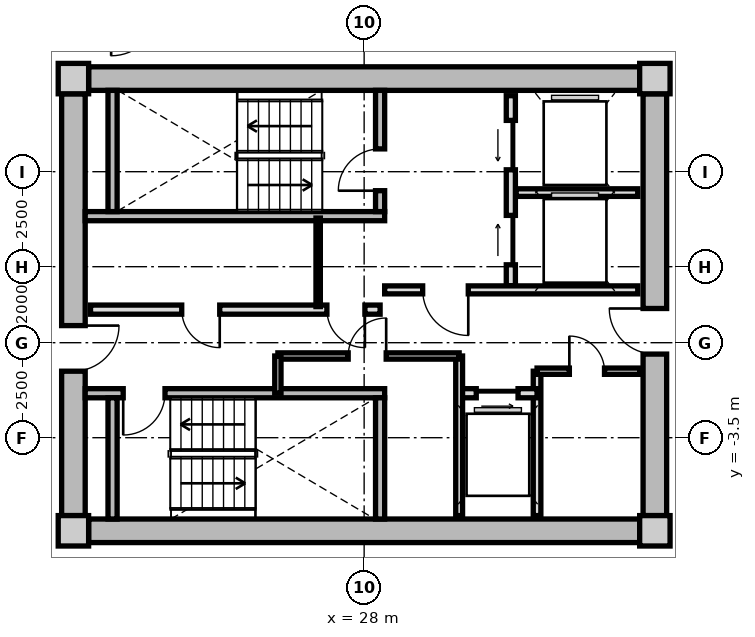
"""IFC4 building model, lengths in metres.
Left out: names, types, materials, properties, quantities, classifications, styles, units other than length and angle.
Written with IfcOpenShell. Run it as: python <this file> out.ifc"""

import sys

from ifc_helpers import new_model, si_unit, direction, frame, frame_2d, origin, origin_2d, place, context, subcontext, project, spatial, rectangle, extrude, source, transform, mapped, element, fill, save


model = new_model("IFC4")
c1 = context("Model", 3, precision=1e-05, world=origin(), true_north=direction((0.0, 1.0)))
c2 = subcontext(c1, "Body", "Model", "MODEL_VIEW")
j1 = project(units=[si_unit("LENGTHUNIT", "METRE"), si_unit("PLANEANGLEUNIT", "RADIAN")], contexts=[c1])
p1 = place(None, origin())
s1 = spatial("IfcSite", under=j1, at=p1, CompositionType="ELEMENT")
p2 = place(p1, origin())
s2 = spatial("IfcBuilding", under=s1, at=p2, CompositionType="ELEMENT")
p3 = place(p2, frame((0.0, 0.0, 173.95)))
s3 = spatial("IfcBuildingStorey", under=s2, at=p3, CompositionType="ELEMENT", Elevation=173.95)
m1 = source(origin(), c2, "Body", "SweptSolid", [
    extrude(rectangle(XDim=0.8, YDim=0.8, at=origin_2d()), origin(), (0.0, 0.0, 1.0), 3.05),
])
for number, where, z_axis, x_axis in (
    (1, (20.35, -5.95, 0.0), (0.0, 0.0, 1.0), (1.0, 0.0, 0.0)),
    (2, (35.65, -5.95, 0.0), (0.0, 0.0, 1.0), (1.0, 0.0, 0.0)),
    (3, (35.65, 5.95, 0.0), (0.0, 0.0, 1.0), (1.0, 0.0, 0.0)),
    (4, (20.35, 5.95, 0.0), (0.0, 0.0, 1.0), (1.0, 0.0, 0.0)),
):
    element("IfcColumn", number, at=place(p3, frame(where, z_axis=z_axis, x_axis=x_axis)), inside=s3, PredefinedType="COLUMN", context=c2, shape_type="MappedRepresentation", body=[
        mapped(m1, transform((0.0, 0.0, 0.0), x_axis=(1.0, 0.0, 0.0), y_axis=(0.0, 1.0, 0.0), z_axis=(0.0, 0.0, 1.0), scale=1.0)),
    ])
m2 = source(origin(), c2, "Body", "SweptSolid", [
    extrude(rectangle(XDim=14.5, YDim=0.62, at=frame_2d((7.25, 0.0))), origin(), (0.0, 0.0, 1.0), 2.81),
])
for number, where, z_axis, x_axis in (
    (5, (20.75, 5.95, 0.0), (0.0, 0.0, 1.0), (1.0, 0.0, 0.0)),
    (6, (35.25, -5.95, 0.0), (0.0, 0.0, 1.0), (-1.0, 0.0, 0.0)),
):
    element("IfcWall", number, at=place(p3, frame(where, z_axis=z_axis, x_axis=x_axis)), inside=s3, PredefinedType="SHEAR", context=c2, shape_type="MappedRepresentation", body=[
        mapped(m2, transform((0.0, 0.0, 0.0), x_axis=(1.0, 0.0, 0.0), y_axis=(0.0, 1.0, 0.0), z_axis=(0.0, 0.0, 1.0), scale=1.0)),
    ])
m3 = source(origin(), c2, "Body", "SweptSolid", [
    extrude(rectangle(XDim=11.1, YDim=0.62, at=frame_2d((5.55, 0.0))), origin(), (0.0, 0.0, 1.0), 2.81),
])
p4 = place(p3, frame((20.35, -5.55, 0.0), z_axis=(0.0, 0.0, 1.0), x_axis=(0.0, 1.0, 0.0)))
e7 = element("IfcWall", 7, at=p4, inside=s3, PredefinedType="SHEAR", context=c2, shape_type="MappedRepresentation", body=[
    mapped(m3, transform((0.0, 0.0, 0.0), x_axis=(1.0, 0.0, 0.0), y_axis=(0.0, 1.0, 0.0), z_axis=(0.0, 0.0, 1.0), scale=1.0)),
])
p5 = place(p4, frame((3.8, 0.0, 0.0)))
e8 = element("IfcOpeningElement", 8, at=p5, cuts=e7, PredefinedType="OPENING", context=c2, shape_type="SweptSolid", body=[
    extrude(rectangle(XDim=1.2, YDim=2.15, at=frame_2d((0.6, 1.075))), frame((0.0, 0.32, 0.0), z_axis=(0.0, -1.0, 0.0), x_axis=(1.0, 0.0, 0.0)), (0.0, 0.0, 1.0), 0.64),
])
p6 = place(p3, frame((35.65, 5.55, 0.0), z_axis=(0.0, 0.0, 1.0), x_axis=(0.0, -1.0, 0.0)))
e9 = element("IfcWall", 9, at=p6, inside=s3, PredefinedType="SHEAR", context=c2, shape_type="MappedRepresentation", body=[
    mapped(m3, transform((0.0, 0.0, 0.0), x_axis=(1.0, 0.0, 0.0), y_axis=(0.0, 1.0, 0.0), z_axis=(0.0, 0.0, 1.0), scale=1.0)),
])
p7 = place(p6, frame((5.65, 0.0, 0.0)))
e10 = element("IfcOpeningElement", 10, at=p7, cuts=e9, PredefinedType="OPENING", context=c2, shape_type="SweptSolid", body=[
    extrude(rectangle(XDim=1.2, YDim=2.15, at=frame_2d((0.6, 1.075))), frame((0.0, 0.32, 0.0), z_axis=(0.0, -1.0, 0.0), x_axis=(1.0, 0.0, 0.0)), (0.0, 0.0, 1.0), 0.64),
])
m4 = source(origin(), c2, "Body", "SweptSolid", [
    extrude(rectangle(XDim=7.88, YDim=0.24, at=frame_2d((3.94, 0.0))), origin(), (0.0, 0.0, 1.0), 2.81),
])
p8 = place(p3, frame((20.66, 2.33, 0.0), z_axis=(0.0, 0.0, 1.0), x_axis=(1.0, 0.0, 0.0)))
e11 = element("IfcWall", 11, at=p8, inside=s3, PredefinedType="PARTITIONING", context=c2, shape_type="MappedRepresentation", body=[
    mapped(m4, transform((0.0, 0.0, 0.0), x_axis=(1.0, 0.0, 0.0), y_axis=(0.0, 1.0, 0.0), z_axis=(0.0, 0.0, 1.0), scale=1.0)),
])
m5 = source(origin(), c2, "Body", "SweptSolid", [
    extrude(rectangle(XDim=3.19, YDim=0.24, at=frame_2d((1.595, 0.0))), origin(), (0.0, 0.0, 1.0), 2.81),
])
p9 = place(p3, frame((21.38, 2.45, 0.0), z_axis=(0.0, 0.0, 1.0), x_axis=(0.0, 1.0, 0.0)))
e12 = element("IfcWall", 12, at=p9, inside=s3, PredefinedType="PARTITIONING", context=c2, shape_type="MappedRepresentation", body=[
    mapped(m5, transform((0.0, 0.0, 0.0), x_axis=(1.0, 0.0, 0.0), y_axis=(0.0, 1.0, 0.0), z_axis=(0.0, 0.0, 1.0), scale=1.0)),
])
p10 = place(p3, frame((28.42, 2.45, 0.0), z_axis=(0.0, 0.0, 1.0), x_axis=(0.0, 1.0, 0.0)))
e13 = element("IfcWall", 13, at=p10, inside=s3, PredefinedType="PARTITIONING", context=c2, shape_type="MappedRepresentation", body=[
    mapped(m5, transform((0.0, 0.0, 0.0), x_axis=(1.0, 0.0, 0.0), y_axis=(0.0, 1.0, 0.0), z_axis=(0.0, 0.0, 1.0), scale=1.0)),
])
p11 = place(p10, frame((0.55, 0.0, 0.0)))
e14 = element("IfcOpeningElement", 14, at=p11, cuts=e13, PredefinedType="OPENING", context=c2, shape_type="SweptSolid", body=[
    extrude(rectangle(XDim=1.1, YDim=2.15, at=frame_2d((0.55, 1.075))), frame((0.0, 0.13, 0.0), z_axis=(0.0, -1.0, 0.0), x_axis=(1.0, 0.0, 0.0)), (0.0, 0.0, 1.0), 0.26),
])
p12 = place(p3, frame((20.66, -2.33, 0.0), z_axis=(0.0, 0.0, 1.0), x_axis=(1.0, 0.0, 0.0)))
e15 = element("IfcWall", 15, at=p12, inside=s3, PredefinedType="PARTITIONING", context=c2, shape_type="MappedRepresentation", body=[
    mapped(m4, transform((0.0, 0.0, 0.0), x_axis=(1.0, 0.0, 0.0), y_axis=(0.0, 1.0, 0.0), z_axis=(0.0, 0.0, 1.0), scale=1.0)),
])
p13 = place(p12, frame((1.0, 0.0, 0.0)))
e16 = element("IfcOpeningElement", 16, at=p13, cuts=e15, PredefinedType="OPENING", context=c2, shape_type="SweptSolid", body=[
    extrude(rectangle(XDim=1.1, YDim=2.15, at=frame_2d((0.55, 1.075))), frame((0.0, 0.13, 0.0), z_axis=(0.0, -1.0, 0.0), x_axis=(1.0, 0.0, 0.0)), (0.0, 0.0, 1.0), 0.26),
])
for number, where, z_axis, x_axis in (
    (17, (21.38, -5.64, 0.0), (0.0, 0.0, 1.0), (0.0, 1.0, 0.0)),
    (18, (28.42, -5.64, 0.0), (0.0, 0.0, 1.0), (0.0, 1.0, 0.0)),
):
    element("IfcWall", number, at=place(p3, frame(where, z_axis=z_axis, x_axis=x_axis)), inside=s3, PredefinedType="PARTITIONING", context=c2, shape_type="MappedRepresentation", body=[
        mapped(m5, transform((0.0, 0.0, 0.0), x_axis=(1.0, 0.0, 0.0), y_axis=(0.0, 1.0, 0.0), z_axis=(0.0, 0.0, 1.0), scale=1.0)),
    ])
m6 = source(origin(), c2, "Body", "SweptSolid", [
    extrude(rectangle(XDim=5.0, YDim=0.24, at=frame_2d((2.5, 0.0))), origin(), (0.0, 0.0, 1.0), 2.795),
])
p14 = place(p3, frame((31.86, 0.5, 0.0), z_axis=(0.0, 0.0, 1.0), x_axis=(0.0, 1.0, 0.0)))
e19 = element("IfcWall", 19, at=p14, inside=s3, PredefinedType="PARTITIONING", context=c2, shape_type="MappedRepresentation", body=[
    mapped(m6, transform((0.0, 0.0, 0.0), x_axis=(1.0, 0.0, 0.0), y_axis=(0.0, 1.0, 0.0), z_axis=(0.0, 0.0, 1.0), scale=1.0)),
])
p15 = place(p14, frame((3.05, 0.0, 0.0)))
e20 = element("IfcOpeningElement", 20, at=p15, cuts=e19, PredefinedType="OPENING", context=c2, shape_type="SweptSolid", body=[
    extrude(rectangle(XDim=1.3, YDim=2.2, at=frame_2d((0.65, 1.1))), frame((0.0, 0.13, 0.0), z_axis=(0.0, -1.0, 0.0), x_axis=(1.0, 0.0, 0.0)), (0.0, 0.0, 1.0), 0.26),
])
p16 = place(p14, frame((0.55, 0.0, 0.0)))
e21 = element("IfcOpeningElement", 21, at=p16, cuts=e19, PredefinedType="OPENING", context=c2, shape_type="SweptSolid", body=[
    extrude(rectangle(XDim=1.3, YDim=2.2, at=frame_2d((0.65, 1.1))), frame((0.0, 0.13, 0.0), z_axis=(0.0, -1.0, 0.0), x_axis=(1.0, 0.0, 0.0)), (0.0, 0.0, 1.0), 0.26),
])
m7 = source(origin(), c2, "Body", "SweptSolid", [
    extrude(rectangle(XDim=3.2, YDim=0.2, at=frame_2d((1.6, 0.0))), origin(), (0.0, 0.0, 1.0), 2.795),
])
p17 = place(p3, frame((32.0, 2.95, 0.0), z_axis=(0.0, 0.0, 1.0), x_axis=(1.0, 0.0, 0.0)))
e22 = element("IfcWall", 22, at=p17, inside=s3, PredefinedType="PARTITIONING", context=c2, shape_type="MappedRepresentation", body=[
    mapped(m7, transform((0.0, 0.0, 0.0), x_axis=(1.0, 0.0, 0.0), y_axis=(0.0, 1.0, 0.0), z_axis=(0.0, 0.0, 1.0), scale=1.0)),
])
m8 = source(origin(), c2, "Body", "SweptSolid", [
    extrude(rectangle(XDim=6.66, YDim=0.21, at=frame_2d((3.33, 0.0))), origin(), (0.0, 0.0, 1.0), 2.795),
])
p18 = place(p3, frame((28.54, 0.39, 0.0), z_axis=(0.0, 0.0, 1.0), x_axis=(1.0, 0.0, 0.0)))
e23 = element("IfcWall", 23, at=p18, inside=s3, PredefinedType="PARTITIONING", context=c2, shape_type="MappedRepresentation", body=[
    mapped(m8, transform((0.0, 0.0, 0.0), x_axis=(1.0, 0.0, 0.0), y_axis=(0.0, 1.0, 0.0), z_axis=(0.0, 0.0, 1.0), scale=1.0)),
])
p19 = place(p18, frame((1.0, 0.0, 0.0)))
e24 = element("IfcOpeningElement", 24, at=p19, cuts=e23, PredefinedType="OPENING", context=c2, shape_type="SweptSolid", body=[
    extrude(rectangle(XDim=1.2, YDim=2.15, at=frame_2d((0.6, 1.075))), frame((0.0, 0.115, 0.0), z_axis=(0.0, -1.0, 0.0), x_axis=(1.0, 0.0, 0.0)), (0.0, 0.0, 1.0), 0.23),
])
m9 = source(origin(), c2, "Body", "SweptSolid", [
    extrude(rectangle(XDim=7.62, YDim=0.24, at=frame_2d((3.81, 0.0))), origin(), (0.0, 0.0, 1.0), 2.795),
])
p20 = place(p3, frame((20.8, -0.13, 0.0), z_axis=(0.0, 0.0, 1.0), x_axis=(1.0, 0.0, 0.0)))
e25 = element("IfcWall", 25, at=p20, inside=s3, PredefinedType="PARTITIONING", context=c2, shape_type="MappedRepresentation", body=[
    mapped(m9, transform((0.0, 0.0, 0.0), x_axis=(1.0, 0.0, 0.0), y_axis=(0.0, 1.0, 0.0), z_axis=(0.0, 0.0, 1.0), scale=1.0)),
])
p21 = place(p20, frame((6.22, 0.0, 0.0)))
e26 = element("IfcOpeningElement", 26, at=p21, cuts=e25, PredefinedType="OPENING", context=c2, shape_type="SweptSolid", body=[
    extrude(rectangle(XDim=1.0, YDim=2.1, at=frame_2d((0.5, 1.05))), frame((0.0, 0.13, 0.0), z_axis=(0.0, -1.0, 0.0), x_axis=(1.0, 0.0, 0.0)), (0.0, 0.0, 1.0), 0.26),
])
p22 = place(p20, frame((2.4, 0.0, 0.0)))
e27 = element("IfcOpeningElement", 27, at=p22, cuts=e25, PredefinedType="OPENING", context=c2, shape_type="SweptSolid", body=[
    extrude(rectangle(XDim=1.0, YDim=2.1, at=frame_2d((0.5, 1.05))), frame((0.0, 0.13, 0.0), z_axis=(0.0, -1.0, 0.0), x_axis=(1.0, 0.0, 0.0)), (0.0, 0.0, 1.0), 0.26),
])
m10 = source(origin(), c2, "Body", "SweptSolid", [
    extrude(rectangle(XDim=2.33, YDim=0.115, at=frame_2d((1.165, 0.0))), origin(), (0.0, 0.0, 1.0), 2.795),
])
p23 = place(p3, frame((26.79, -0.05, 0.0), z_axis=(0.0, 0.0, 1.0), x_axis=(0.0, 1.0, 0.0)))
e28 = element("IfcWall", 28, at=p23, inside=s3, PredefinedType="PARTITIONING", context=c2, shape_type="MappedRepresentation", body=[
    mapped(m10, transform((0.0, 0.0, 0.0), x_axis=(1.0, 0.0, 0.0), y_axis=(0.0, 1.0, 0.0), z_axis=(0.0, 0.0, 1.0), scale=1.0)),
])
m11 = source(origin(), c2, "Body", "SweptSolid", [
    extrude(rectangle(XDim=3.8, YDim=0.2, at=frame_2d((1.9, 0.0))), origin(), (0.0, 0.0, 1.0), 2.795),
])
p24 = place(p3, frame((32.55, -5.55, 0.0), z_axis=(0.0, 0.0, 1.0), x_axis=(0.0, 1.0, 0.0)))
e29 = element("IfcWall", 29, at=p24, inside=s3, PredefinedType="PARTITIONING", context=c2, shape_type="MappedRepresentation", body=[
    mapped(m11, transform((0.0, 0.0, 0.0), x_axis=(1.0, 0.0, 0.0), y_axis=(0.0, 1.0, 0.0), z_axis=(0.0, 0.0, 1.0), scale=1.0)),
])
m12 = source(origin(), c2, "Body", "SweptSolid", [
    extrude(rectangle(XDim=2.05, YDim=0.24, at=frame_2d((1.025, 0.0))), origin(), (0.0, 0.0, 1.0), 2.795),
])
p25 = place(p3, frame((30.5, -2.33, 0.0), z_axis=(0.0, 0.0, 1.0), x_axis=(1.0, 0.0, 0.0)))
e30 = element("IfcWall", 30, at=p25, inside=s3, PredefinedType="PARTITIONING", context=c2, shape_type="MappedRepresentation", body=[
    mapped(m12, transform((0.0, 0.0, 0.0), x_axis=(1.0, 0.0, 0.0), y_axis=(0.0, 1.0, 0.0), z_axis=(0.0, 0.0, 1.0), scale=1.0)),
])
p26 = place(p25, frame((0.45, 0.0, 0.0)))
e31 = element("IfcOpeningElement", 31, at=p26, cuts=e30, PredefinedType="OPENING", context=c2, shape_type="SweptSolid", body=[
    extrude(rectangle(XDim=1.1, YDim=2.2, at=frame_2d((0.55, 1.1))), frame((0.0, 0.13, 0.0), z_axis=(0.0, -1.0, 0.0), x_axis=(1.0, 0.0, 0.0)), (0.0, 0.0, 1.0), 0.26),
])
m13 = source(origin(), c2, "Body", "SweptSolid", [
    extrude(rectangle(XDim=4.2, YDim=0.18, at=frame_2d((2.1, 0.0))), origin(), (0.0, 0.0, 1.0), 2.795),
])
p27 = place(p3, frame((30.5, -5.55, 0.0), z_axis=(0.0, 0.0, 1.0), x_axis=(0.0, 1.0, 0.0)))
e32 = element("IfcWall", 32, at=p27, inside=s3, PredefinedType="PARTITIONING", context=c2, shape_type="MappedRepresentation", body=[
    mapped(m13, transform((0.0, 0.0, 0.0), x_axis=(1.0, 0.0, 0.0), y_axis=(0.0, 1.0, 0.0), z_axis=(0.0, 0.0, 1.0), scale=1.0)),
])
m14 = source(origin(), c2, "Body", "SweptSolid", [
    extrude(rectangle(XDim=4.77, YDim=0.165, at=frame_2d((2.385, 0.0))), origin(), (0.0, 0.0, 1.0), 2.795),
])
p28 = place(p3, frame((25.73, -1.35, 0.0), z_axis=(0.0, 0.0, 1.0), x_axis=(1.0, 0.0, 0.0)))
e33 = element("IfcWall", 33, at=p28, inside=s3, PredefinedType="PARTITIONING", context=c2, shape_type="MappedRepresentation", body=[
    mapped(m14, transform((0.0, 0.0, 0.0), x_axis=(1.0, 0.0, 0.0), y_axis=(0.0, 1.0, 0.0), z_axis=(0.0, 0.0, 1.0), scale=1.0)),
])
p29 = place(p28, frame((1.85, 0.0, 0.0)))
e34 = element("IfcOpeningElement", 34, at=p29, cuts=e33, PredefinedType="OPENING", context=c2, shape_type="SweptSolid", body=[
    extrude(rectangle(XDim=1.0, YDim=2.1, at=frame_2d((0.5, 1.05))), frame((0.0, 0.093, 0.0), z_axis=(0.0, -1.0, 0.0), x_axis=(1.0, 0.0, 0.0)), (0.0, 0.0, 1.0), 0.185),
])
m15 = source(origin(), c2, "Body", "SweptSolid", [
    extrude(rectangle(XDim=0.98, YDim=0.165, at=frame_2d((0.49, 0.0))), origin(), (0.0, 0.0, 1.0), 2.795),
])
p30 = place(p3, frame((25.73, -2.33, 0.0), z_axis=(0.0, 0.0, 1.0), x_axis=(0.0, 1.0, 0.0)))
e35 = element("IfcWall", 35, at=p30, inside=s3, PredefinedType="PARTITIONING", context=c2, shape_type="MappedRepresentation", body=[
    mapped(m15, transform((0.0, 0.0, 0.0), x_axis=(1.0, 0.0, 0.0), y_axis=(0.0, 1.0, 0.0), z_axis=(0.0, 0.0, 1.0), scale=1.0)),
])
m16 = source(origin(), c2, "Body", "SweptSolid", [
    extrude(rectangle(XDim=2.7, YDim=0.165, at=frame_2d((1.35, 0.0))), origin(), (0.0, 0.0, 1.0), 2.795),
])
p31 = place(p3, frame((32.55, -1.75, 0.0), z_axis=(0.0, 0.0, 1.0), x_axis=(1.0, 0.0, 0.0)))
e36 = element("IfcWall", 36, at=p31, inside=s3, PredefinedType="PARTITIONING", context=c2, shape_type="MappedRepresentation", body=[
    mapped(m16, transform((0.0, 0.0, 0.0), x_axis=(1.0, 0.0, 0.0), y_axis=(0.0, 1.0, 0.0), z_axis=(0.0, 0.0, 1.0), scale=1.0)),
])
p32 = place(p31, frame((0.85, 0.0, 0.0)))
e37 = element("IfcOpeningElement", 37, at=p32, cuts=e36, PredefinedType="OPENING", context=c2, shape_type="SweptSolid", body=[
    extrude(rectangle(XDim=0.925, YDim=2.1, at=frame_2d((0.462, 1.05))), frame((0.0, 0.093, 0.0), z_axis=(0.0, -1.0, 0.0), x_axis=(1.0, 0.0, 0.0)), (0.0, 0.0, 1.0), 0.185),
])
m17 = source(origin(), c2, "Body", "SweptSolid", [
    extrude(rectangle(XDim=1.1, YDim=2.15, at=frame_2d((0.55, 1.075))), frame((0.0, 0.025, 0.0), z_axis=(0.0, -1.0, 0.0), x_axis=(1.0, 0.0, 0.0)), (0.0, 0.0, 1.0), 0.05),
])
p33 = place(p11, origin())
e38 = element("IfcDoor", 38, at=p33, inside=s3, OperationType="SINGLE_SWING_LEFT", PredefinedType="DOOR", context=c2, shape_type="MappedRepresentation", body=[
    mapped(m17, transform((0.0, 0.0, 0.0), x_axis=(1.0, 0.0, 0.0), y_axis=(0.0, 1.0, 0.0), z_axis=(0.0, 0.0, 1.0), scale=1.0)),
])
fill(e14, e38)
p34 = place(p13, frame((1.1, 0.0, 0.0), z_axis=(0.0, 0.0, 1.0), x_axis=(-1.0, 0.0, 0.0)))
e39 = element("IfcDoor", 39, at=p34, inside=s3, OperationType="SINGLE_SWING_RIGHT", PredefinedType="DOOR", context=c2, shape_type="MappedRepresentation", body=[
    mapped(m17, transform((0.0, 0.0, 0.0), x_axis=(1.0, 0.0, 0.0), y_axis=(0.0, 1.0, 0.0), z_axis=(0.0, 0.0, 1.0), scale=1.0)),
])
fill(e16, e39)
m18 = source(origin(), c2, "Body", "SweptSolid", [
    extrude(rectangle(XDim=1.3, YDim=2.2, at=frame_2d((0.65, 1.1))), frame((0.0, 0.025, 0.0), z_axis=(0.0, -1.0, 0.0), x_axis=(1.0, 0.0, 0.0)), (0.0, 0.0, 1.0), 0.05),
])
p35 = place(p15, origin())
e40 = element("IfcDoor", 40, at=p35, inside=s3, OperationType="SLIDING_TO_LEFT", PredefinedType="DOOR", context=c2, shape_type="MappedRepresentation", body=[
    mapped(m18, transform((0.0, 0.0, 0.0), x_axis=(1.0, 0.0, 0.0), y_axis=(0.0, 1.0, 0.0), z_axis=(0.0, 0.0, 1.0), scale=1.0)),
])
fill(e20, e40)
p36 = place(p16, origin())
e41 = element("IfcDoor", 41, at=p36, inside=s3, OperationType="SLIDING_TO_RIGHT", PredefinedType="DOOR", context=c2, shape_type="MappedRepresentation", body=[
    mapped(m18, transform((0.0, 0.0, 0.0), x_axis=(1.0, 0.0, 0.0), y_axis=(0.0, 1.0, 0.0), z_axis=(0.0, 0.0, 1.0), scale=1.0)),
])
fill(e21, e41)
m19 = source(origin(), c2, "Body", "SweptSolid", [
    extrude(rectangle(XDim=1.2, YDim=2.15, at=frame_2d((0.6, 1.075))), frame((0.0, 0.025, 0.0), z_axis=(0.0, -1.0, 0.0), x_axis=(1.0, 0.0, 0.0)), (0.0, 0.0, 1.0), 0.05),
])
p37 = place(p19, frame((1.2, 0.0, 0.0), z_axis=(0.0, 0.0, 1.0), x_axis=(-1.0, 0.0, 0.0)))
e42 = element("IfcDoor", 42, at=p37, inside=s3, OperationType="SINGLE_SWING_LEFT", PredefinedType="DOOR", context=c2, shape_type="MappedRepresentation", body=[
    mapped(m19, transform((0.0, 0.0, 0.0), x_axis=(1.0, 0.0, 0.0), y_axis=(0.0, 1.0, 0.0), z_axis=(0.0, 0.0, 1.0), scale=1.0)),
])
fill(e24, e42)
p38 = place(p5, frame((1.2, 0.0, 0.0), z_axis=(0.0, 0.0, 1.0), x_axis=(-1.0, 0.0, 0.0)))
e43 = element("IfcDoor", 43, at=p38, inside=s3, OperationType="SINGLE_SWING_LEFT", PredefinedType="DOOR", context=c2, shape_type="MappedRepresentation", body=[
    mapped(m19, transform((0.0, 0.0, 0.0), x_axis=(1.0, 0.0, 0.0), y_axis=(0.0, 1.0, 0.0), z_axis=(0.0, 0.0, 1.0), scale=1.0)),
])
fill(e8, e43)
p39 = place(p7, frame((1.2, 0.0, 0.0), z_axis=(0.0, 0.0, 1.0), x_axis=(-1.0, 0.0, 0.0)))
e44 = element("IfcDoor", 44, at=p39, inside=s3, OperationType="SINGLE_SWING_RIGHT", PredefinedType="DOOR", context=c2, shape_type="MappedRepresentation", body=[
    mapped(m19, transform((0.0, 0.0, 0.0), x_axis=(1.0, 0.0, 0.0), y_axis=(0.0, 1.0, 0.0), z_axis=(0.0, 0.0, 1.0), scale=1.0)),
])
fill(e10, e44)
m20 = source(origin(), c2, "Body", "SweptSolid", [
    extrude(rectangle(XDim=1.0, YDim=2.1, at=frame_2d((0.5, 1.05))), frame((0.0, 0.025, 0.0), z_axis=(0.0, -1.0, 0.0), x_axis=(1.0, 0.0, 0.0)), (0.0, 0.0, 1.0), 0.05),
])
p40 = place(p21, frame((1.0, 0.0, 0.0), z_axis=(0.0, 0.0, 1.0), x_axis=(-1.0, 0.0, 0.0)))
e45 = element("IfcDoor", 45, at=p40, inside=s3, OperationType="SINGLE_SWING_LEFT", PredefinedType="DOOR", context=c2, shape_type="MappedRepresentation", body=[
    mapped(m20, transform((0.0, 0.0, 0.0), x_axis=(1.0, 0.0, 0.0), y_axis=(0.0, 1.0, 0.0), z_axis=(0.0, 0.0, 1.0), scale=1.0)),
])
fill(e26, e45)
p41 = place(p22, frame((1.0, 0.0, 0.0), z_axis=(0.0, 0.0, 1.0), x_axis=(-1.0, 0.0, 0.0)))
e46 = element("IfcDoor", 46, at=p41, inside=s3, OperationType="SINGLE_SWING_LEFT", PredefinedType="DOOR", context=c2, shape_type="MappedRepresentation", body=[
    mapped(m20, transform((0.0, 0.0, 0.0), x_axis=(1.0, 0.0, 0.0), y_axis=(0.0, 1.0, 0.0), z_axis=(0.0, 0.0, 1.0), scale=1.0)),
])
fill(e27, e46)
m21 = source(origin(), c2, "Body", "SweptSolid", [
    extrude(rectangle(XDim=1.1, YDim=2.2, at=frame_2d((0.55, 1.1))), frame((0.0, 0.025, 0.0), z_axis=(0.0, -1.0, 0.0), x_axis=(1.0, 0.0, 0.0)), (0.0, 0.0, 1.0), 0.05),
])
p42 = place(p26, frame((1.1, 0.0, 0.0), z_axis=(0.0, 0.0, 1.0), x_axis=(-1.0, 0.0, 0.0)))
e47 = element("IfcDoor", 47, at=p42, inside=s3, OperationType="SLIDING_TO_RIGHT", PredefinedType="DOOR", context=c2, shape_type="MappedRepresentation", body=[
    mapped(m21, transform((0.0, 0.0, 0.0), x_axis=(1.0, 0.0, 0.0), y_axis=(0.0, 1.0, 0.0), z_axis=(0.0, 0.0, 1.0), scale=1.0)),
])
fill(e31, e47)
p43 = place(p29, origin())
e48 = element("IfcDoor", 48, at=p43, inside=s3, OperationType="SINGLE_SWING_RIGHT", PredefinedType="DOOR", context=c2, shape_type="MappedRepresentation", body=[
    mapped(m20, transform((0.0, 0.0, 0.0), x_axis=(1.0, 0.0, 0.0), y_axis=(0.0, 1.0, 0.0), z_axis=(0.0, 0.0, 1.0), scale=1.0)),
])
fill(e34, e48)
m22 = source(origin(), c2, "Body", "SweptSolid", [
    extrude(rectangle(XDim=0.925, YDim=2.1, at=frame_2d((0.462, 1.05))), frame((0.0, 0.025, 0.0), z_axis=(0.0, -1.0, 0.0), x_axis=(1.0, 0.0, 0.0)), (0.0, 0.0, 1.0), 0.05),
])
p44 = place(p32, origin())
e49 = element("IfcDoor", 49, at=p44, inside=s3, OperationType="SINGLE_SWING_LEFT", PredefinedType="DOOR", context=c2, shape_type="MappedRepresentation", body=[
    mapped(m22, transform((0.0, 0.0, 0.0), x_axis=(1.0, 0.0, 0.0), y_axis=(0.0, 1.0, 0.0), z_axis=(0.0, 0.0, 1.0), scale=1.0)),
])
fill(e37, e49)
save(model, sys.argv[1])
